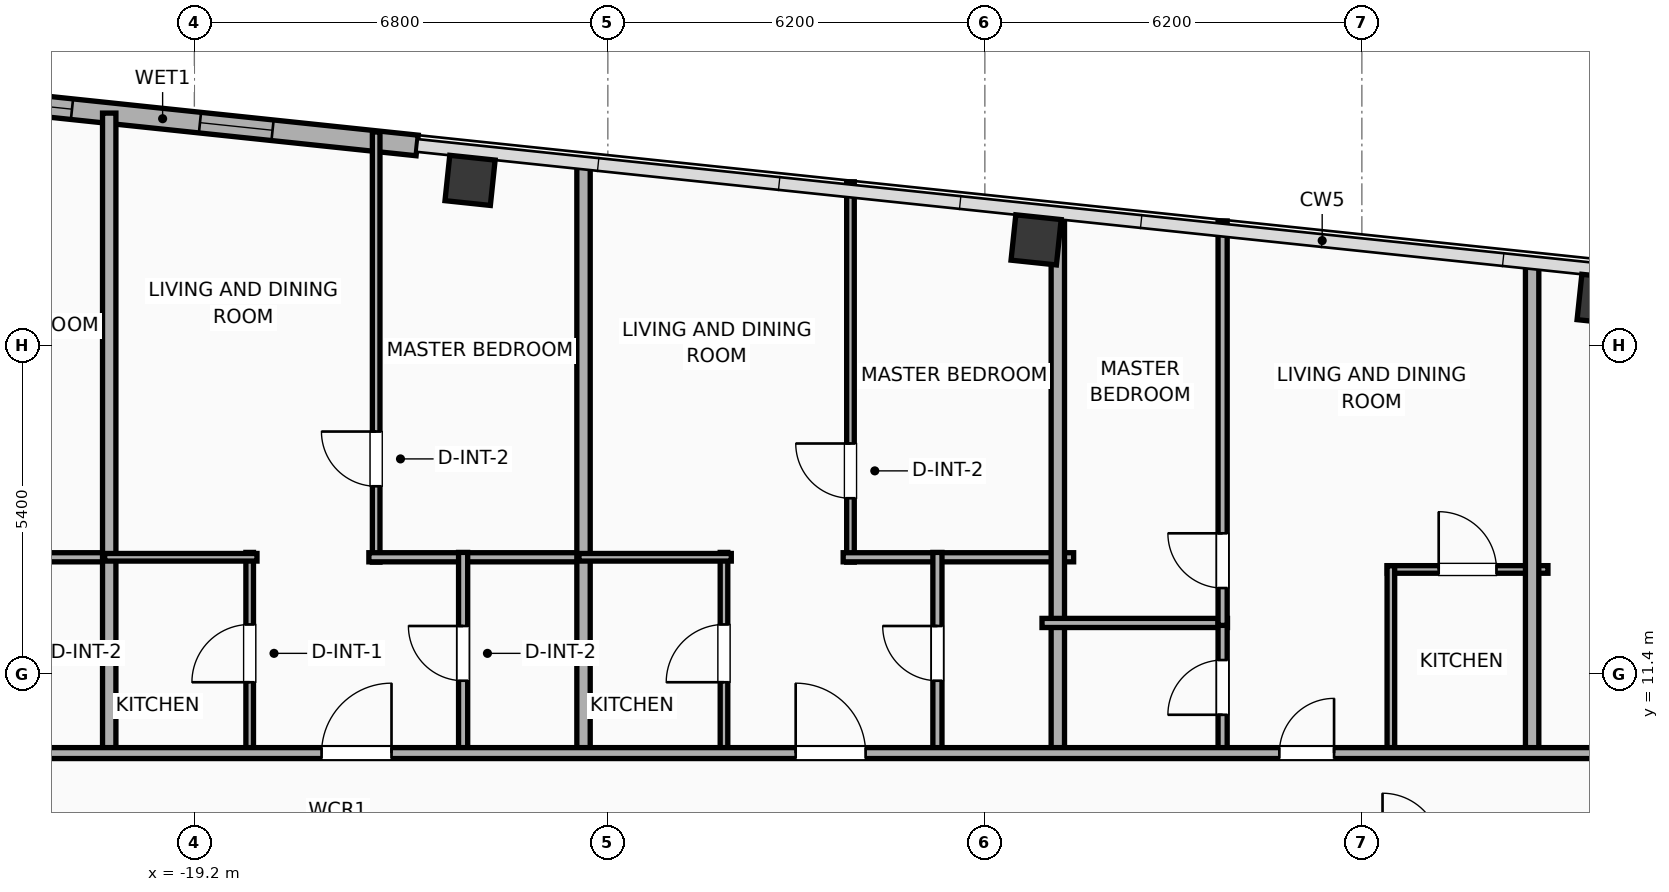
"""IFC4 building model, lengths in metres.
Left out: names, types, materials, properties, quantities, classifications, styles, units other than length and angle.
Written with IfcOpenShell. Run it as: python <this file> out.ifc"""

import sys

from ifc_helpers import new_model, si_unit, direction, frame, frame_2d, origin, origin_2d, place, context, subcontext, project, spatial, rectangle, hollow_rectangle, extrude, element, fill, save


model = new_model("IFC4")
c1 = context("Model", 3, precision=1e-05, world=origin(), true_north=direction((0.0, 1.0)))
c2 = subcontext(c1, "Body", "Model", "MODEL_VIEW")
j1 = project(units=[si_unit("LENGTHUNIT", "METRE"), si_unit("PLANEANGLEUNIT", "RADIAN")], contexts=[c1])
p1 = place(None, origin())
s1 = spatial("IfcSite", under=j1, at=p1, CompositionType="ELEMENT")
p2 = place(p1, origin())
s2 = spatial("IfcBuilding", under=s1, at=p2, CompositionType="ELEMENT")
p3 = place(p2, frame((0.0, 0.0, 260.0)))
s3 = spatial("IfcBuildingStorey", under=s2, at=p3, CompositionType="ELEMENT", Elevation=260.0)
for number, where, z_axis, x_axis in (
    (1, (3.952, 17.561, 0.0), (0.0, 0.0, 1.0), (0.995, -0.105, 0.0)),
    (2, (-5.357, 18.54, 0.0), (0.0, 0.0, 1.0), (0.995, -0.105, 0.0)),
    (3, (-14.666, 19.518, 0.0), (0.0, 0.0, 1.0), (0.995, -0.105, 0.0)),
):
    element("IfcColumn", number, at=place(p3, frame(where, z_axis=z_axis, x_axis=x_axis)), inside=s3, PredefinedType="COLUMN", context=c2, shape_type="SweptSolid", body=[
        extrude(hollow_rectangle(XDim=0.75, YDim=0.75, WallThickness=0.025, at=origin_2d()), origin(), (0.0, 0.0, 1.0), 3.9),
    ])
p4 = place(p3, frame((-23.908, 20.972, 0.0), z_axis=(0.0, 0.0, 1.0), x_axis=(0.994522285292, -0.104524753323, 0.0)))
e4 = element("IfcWall", 4, at=p4, inside=s3, PredefinedType="ELEMENTEDWALL", context=c2, shape_type="SweptSolid", body=[
    extrude(rectangle(XDim=8.418, YDim=0.34, at=frame_2d((4.209, 0.0))), origin(), (0.0, 0.0, 1.0), 2.54),
])
p5 = place(p4, frame((1.51, 0.0, 0.75)))
e5 = element("IfcOpeningElement", 5, at=p5, cuts=e4, PredefinedType="OPENING", context=c2, shape_type="SweptSolid", body=[
    extrude(rectangle(XDim=1.2, YDim=1.63, at=frame_2d((0.6, 0.815))), frame((0.0, 0.18, 0.0), z_axis=(0.0, -1.0, 0.0), x_axis=(1.0, 0.0, 0.0)), (0.0, 0.0, 1.0), 0.36),
])
p6 = place(p4, frame((4.827, 0.0, 0.75)))
e6 = element("IfcOpeningElement", 6, at=p6, cuts=e4, PredefinedType="OPENING", context=c2, shape_type="SweptSolid", body=[
    extrude(rectangle(XDim=1.2, YDim=1.63, at=frame_2d((0.6, 0.815))), frame((0.0, 0.18, 0.0), z_axis=(0.0, -1.0, 0.0), x_axis=(1.0, 0.0, 0.0)), (0.0, 0.0, 1.0), 0.36),
])
p7 = place(p3, frame((-24.13, 13.32, 0.0), z_axis=(0.0, 0.0, 1.0), x_axis=(1.0, 0.0, 0.0)))
e7 = element("IfcWall", 7, at=p7, inside=s3, PredefinedType="PLUMBINGWALL", context=c2, shape_type="SweptSolid", body=[
    extrude(rectangle(XDim=3.605, YDim=0.15, at=frame_2d((1.802, 0.0))), origin(), (0.0, 0.0, 1.0), 3.65),
])
p8 = place(p3, frame((-20.6, 10.02, 0.0), z_axis=(0.0, 0.0, 1.0), x_axis=(0.0, 1.0, 0.0)))
e8 = element("IfcWall", 8, at=p8, inside=s3, PredefinedType="PARTITIONING", context=c2, shape_type="SweptSolid", body=[
    extrude(rectangle(XDim=10.604, YDim=0.22, at=frame_2d((5.302, 0.0))), origin(), (0.0, 0.0, 1.0), 2.54),
])
p9 = place(p3, frame((-16.21, 13.24, 0.0), z_axis=(0.0, 0.0, 1.0), x_axis=(0.0, 1.0, 0.0)))
e9 = element("IfcWall", 9, at=p9, inside=s3, PredefinedType="PARTITIONING", context=c2, shape_type="SweptSolid", body=[
    extrude(rectangle(XDim=7.074, YDim=0.125, at=frame_2d((3.537, 0.0))), origin(), (0.0, 0.0, 1.0), 3.65),
])
p10 = place(p9, frame((1.248, 0.0, 0.0)))
e10 = element("IfcOpeningElement", 10, at=p10, cuts=e9, PredefinedType="OPENING", context=c2, shape_type="SweptSolid", body=[
    extrude(rectangle(XDim=0.9, YDim=2.05, at=frame_2d((0.45, 1.025))), frame((0.0, 0.073, 0.0), z_axis=(0.0, -1.0, 0.0), x_axis=(1.0, 0.0, 0.0)), (0.0, 0.0, 1.0), 0.145),
])
p11 = place(p3, frame((-16.33, 13.32, 0.0), z_axis=(0.0, 0.0, 1.0), x_axis=(1.0, 0.0, 0.0)))
e11 = element("IfcWall", 11, at=p11, inside=s3, PredefinedType="PLUMBINGWALL", context=c2, shape_type="SweptSolid", body=[
    extrude(rectangle(XDim=3.605, YDim=0.15, at=frame_2d((1.802, 0.0))), origin(), (0.0, 0.0, 1.0), 3.65),
])
p12 = place(p3, frame((-18.29, 10.08, 0.0), z_axis=(0.0, 0.0, 1.0), x_axis=(0.0, 1.0, 0.0)))
e12 = element("IfcWall", 12, at=p12, inside=s3, PredefinedType="PARTITIONING", context=c2, shape_type="SweptSolid", body=[
    extrude(rectangle(XDim=3.32, YDim=0.125, at=frame_2d((1.66, 0.0))), origin(), (0.0, 0.0, 1.0), 3.65),
])
p13 = place(p12, frame((1.185, 0.0, 0.0)))
e13 = element("IfcOpeningElement", 13, at=p13, cuts=e12, PredefinedType="OPENING", context=c2, shape_type="SweptSolid", body=[
    extrude(rectangle(XDim=0.95, YDim=2.05, at=frame_2d((0.475, 1.025))), frame((0.0, 0.073, 0.0), z_axis=(0.0, -1.0, 0.0), x_axis=(1.0, 0.0, 0.0)), (0.0, 0.0, 1.0), 0.145),
])
p14 = place(p3, frame((-20.675, 13.32, 0.0), z_axis=(0.0, 0.0, 1.0), x_axis=(1.0, 0.0, 0.0)))
e14 = element("IfcWall", 14, at=p14, inside=s3, PredefinedType="PARTITIONING", context=c2, shape_type="SweptSolid", body=[
    extrude(rectangle(XDim=2.505, YDim=0.125, at=frame_2d((1.252, 0.0))), origin(), (0.0, 0.0, 1.0), 3.65),
])
p15 = place(p3, frame((-14.78, 10.08, 0.0), z_axis=(0.0, 0.0, 1.0), x_axis=(0.0, 1.0, 0.0)))
e15 = element("IfcWall", 15, at=p15, inside=s3, PredefinedType="PLUMBINGWALL", context=c2, shape_type="SweptSolid", body=[
    extrude(rectangle(XDim=3.32, YDim=0.15, at=frame_2d((1.66, 0.0))), origin(), (0.0, 0.0, 1.0), 2.54),
])
p16 = place(p15, frame((1.21, 0.0, 0.0)))
e16 = element("IfcOpeningElement", 16, at=p16, cuts=e15, PredefinedType="OPENING", context=c2, shape_type="SweptSolid", body=[
    extrude(rectangle(XDim=0.9, YDim=2.05, at=frame_2d((0.45, 1.025))), frame((0.0, 0.085, 0.0), z_axis=(0.0, -1.0, 0.0), x_axis=(1.0, 0.0, 0.0)), (0.0, 0.0, 1.0), 0.17),
])
p17 = place(p3, frame((-12.8, 10.02, 0.0), z_axis=(0.0, 0.0, 1.0), x_axis=(0.0, 1.0, 0.0)))
e17 = element("IfcWall", 17, at=p17, inside=s3, PredefinedType="PARTITIONING", context=c2, shape_type="SweptSolid", body=[
    extrude(rectangle(XDim=9.785, YDim=0.22, at=frame_2d((4.892, 0.0))), origin(), (0.0, 0.0, 1.0), 3.65),
])
p18 = place(p3, frame((-8.41, 13.24, 0.0), z_axis=(0.0, 0.0, 1.0), x_axis=(0.0, 1.0, 0.0)))
e18 = element("IfcWall", 18, at=p18, inside=s3, PredefinedType="PARTITIONING", context=c2, shape_type="SweptSolid", body=[
    extrude(rectangle(XDim=6.254, YDim=0.125, at=frame_2d((3.127, 0.0))), origin(), (0.0, 0.0, 1.0), 3.65),
])
p19 = place(p18, frame((1.051, 0.0, 0.0)))
e19 = element("IfcOpeningElement", 19, at=p19, cuts=e18, PredefinedType="OPENING", context=c2, shape_type="SweptSolid", body=[
    extrude(rectangle(XDim=0.9, YDim=2.05, at=frame_2d((0.45, 1.025))), frame((0.0, 0.073, 0.0), z_axis=(0.0, -1.0, 0.0), x_axis=(1.0, 0.0, 0.0)), (0.0, 0.0, 1.0), 0.145),
])
p20 = place(p3, frame((-8.53, 13.32, 0.0), z_axis=(0.0, 0.0, 1.0), x_axis=(1.0, 0.0, 0.0)))
e20 = element("IfcWall", 20, at=p20, inside=s3, PredefinedType="PLUMBINGWALL", context=c2, shape_type="SweptSolid", body=[
    extrude(rectangle(XDim=3.79, YDim=0.15, at=frame_2d((1.895, 0.0))), origin(), (0.0, 0.0, 1.0), 3.65),
])
p21 = place(p3, frame((-10.49, 10.08, 0.0), z_axis=(0.0, 0.0, 1.0), x_axis=(0.0, 1.0, 0.0)))
e21 = element("IfcWall", 21, at=p21, inside=s3, PredefinedType="PARTITIONING", context=c2, shape_type="SweptSolid", body=[
    extrude(rectangle(XDim=3.32, YDim=0.125, at=frame_2d((1.66, 0.0))), origin(), (0.0, 0.0, 1.0), 3.65),
])
p22 = place(p21, frame((1.185, 0.0, 0.0)))
e22 = element("IfcOpeningElement", 22, at=p22, cuts=e21, PredefinedType="OPENING", context=c2, shape_type="SweptSolid", body=[
    extrude(rectangle(XDim=0.95, YDim=2.05, at=frame_2d((0.475, 1.025))), frame((0.0, 0.073, 0.0), z_axis=(0.0, -1.0, 0.0), x_axis=(1.0, 0.0, 0.0)), (0.0, 0.0, 1.0), 0.145),
])
p23 = place(p3, frame((-12.875, 13.32, 0.0), z_axis=(0.0, 0.0, 1.0), x_axis=(1.0, 0.0, 0.0)))
e23 = element("IfcWall", 23, at=p23, inside=s3, PredefinedType="PARTITIONING", context=c2, shape_type="SweptSolid", body=[
    extrude(rectangle(XDim=2.505, YDim=0.125, at=frame_2d((1.252, 0.0))), origin(), (0.0, 0.0, 1.0), 3.65),
])
p24 = place(p3, frame((-6.98, 10.08, 0.0), z_axis=(0.0, 0.0, 1.0), x_axis=(0.0, 1.0, 0.0)))
e24 = element("IfcWall", 24, at=p24, inside=s3, PredefinedType="PLUMBINGWALL", context=c2, shape_type="SweptSolid", body=[
    extrude(rectangle(XDim=3.32, YDim=0.15, at=frame_2d((1.66, 0.0))), origin(), (0.0, 0.0, 1.0), 3.65),
])
p25 = place(p24, frame((1.21, 0.0, 0.0)))
e25 = element("IfcOpeningElement", 25, at=p25, cuts=e24, PredefinedType="OPENING", context=c2, shape_type="SweptSolid", body=[
    extrude(rectangle(XDim=0.9, YDim=2.05, at=frame_2d((0.45, 1.025))), frame((0.0, 0.085, 0.0), z_axis=(0.0, -1.0, 0.0), x_axis=(1.0, 0.0, 0.0)), (0.0, 0.0, 1.0), 0.17),
])
p26 = place(p3, frame((-5.0, 10.02, 0.0), z_axis=(0.0, 0.0, 1.0), x_axis=(0.0, 1.0, 0.0)))
e26 = element("IfcWall", 26, at=p26, inside=s3, PredefinedType="PARTITIONING", context=c2, shape_type="SweptSolid", body=[
    extrude(rectangle(XDim=8.965, YDim=0.22, at=frame_2d((4.482, 0.0))), origin(), (0.0, 0.0, 1.0), 2.54),
])
p27 = place(p3, frame((-5.26, 12.24, 0.0), z_axis=(0.0, 0.0, 1.0), x_axis=(1.0, 0.0, 0.0)))
e27 = element("IfcWall", 27, at=p27, inside=s3, PredefinedType="PLUMBINGWALL", context=c2, shape_type="SweptSolid", body=[
    extrude(rectangle(XDim=3.05, YDim=0.15, at=frame_2d((1.525, 0.0))), origin(), (0.0, 0.0, 1.0), 3.65),
])
p28 = place(p3, frame((-2.29, 10.08, 0.0), z_axis=(0.0, 0.0, 1.0), x_axis=(0.0, 1.0, 0.0)))
e28 = element("IfcWall", 28, at=p28, inside=s3, PredefinedType="PLUMBINGWALL", context=c2, shape_type="SweptSolid", body=[
    extrude(rectangle(XDim=2.2, YDim=0.15, at=frame_2d((1.1, 0.0))), origin(), (0.0, 0.0, 1.0), 3.65),
])
p29 = place(p28, frame((0.65, 0.0, 0.0)))
e29 = element("IfcOpeningElement", 29, at=p29, cuts=e28, PredefinedType="OPENING", context=c2, shape_type="SweptSolid", body=[
    extrude(rectangle(XDim=0.9, YDim=2.05, at=frame_2d((0.45, 1.025))), frame((0.0, 0.085, 0.0), z_axis=(0.0, -1.0, 0.0), x_axis=(1.0, 0.0, 0.0)), (0.0, 0.0, 1.0), 0.17),
])
p30 = place(p3, frame((-2.29, 12.2, 0.0), z_axis=(0.0, 0.0, 1.0), x_axis=(0.0, 1.0, 0.0)))
e30 = element("IfcWall", 30, at=p30, inside=s3, PredefinedType="PLUMBINGWALL", context=c2, shape_type="SweptSolid", body=[
    extrude(rectangle(XDim=6.651, YDim=0.15, at=frame_2d((3.325, 0.0))), origin(), (0.0, 0.0, 1.0), 3.65),
])
p31 = place(p30, frame((0.614, 0.0, 0.0)))
e31 = element("IfcOpeningElement", 31, at=p31, cuts=e30, PredefinedType="OPENING", context=c2, shape_type="SweptSolid", body=[
    extrude(rectangle(XDim=0.9, YDim=2.05, at=frame_2d((0.45, 1.025))), frame((0.0, 0.085, 0.0), z_axis=(0.0, -1.0, 0.0), x_axis=(1.0, 0.0, 0.0)), (0.0, 0.0, 1.0), 0.17),
])
p32 = place(p3, frame((0.417, 13.12, 0.0), z_axis=(0.0, 0.0, 1.0), x_axis=(1.0, 0.0, 0.0)))
e32 = element("IfcWall", 32, at=p32, inside=s3, PredefinedType="PARTITIONING", context=c2, shape_type="SweptSolid", body=[
    extrude(rectangle(XDim=2.643, YDim=0.125, at=frame_2d((1.322, 0.0))), origin(), (0.0, 0.0, 1.0), 3.65),
])
p33 = place(p32, frame((0.846, 0.0, 0.0)))
e33 = element("IfcOpeningElement", 33, at=p33, cuts=e32, PredefinedType="OPENING", context=c2, shape_type="SweptSolid", body=[
    extrude(rectangle(XDim=0.95, YDim=2.05, at=frame_2d((0.475, 1.025))), frame((0.0, 0.073, 0.0), z_axis=(0.0, -1.0, 0.0), x_axis=(1.0, 0.0, 0.0)), (0.0, 0.0, 1.0), 0.145),
])
p34 = place(p3, frame((0.477, 10.08, 0.0), z_axis=(0.0, 0.0, 1.0), x_axis=(0.0, 1.0, 0.0)))
e34 = element("IfcWall", 34, at=p34, inside=s3, PredefinedType="PARTITIONING", context=c2, shape_type="SweptSolid", body=[
    extrude(rectangle(XDim=3.1, YDim=0.125, at=frame_2d((1.55, 0.0))), origin(), (0.0, 0.0, 1.0), 3.65),
])
p35 = place(p3, frame((2.8, 10.02, 0.0), z_axis=(0.0, 0.0, 1.0), x_axis=(0.0, 1.0, 0.0)))
e35 = element("IfcWall", 35, at=p35, inside=s3, PredefinedType="PARTITIONING", context=c2, shape_type="SweptSolid", body=[
    extrude(rectangle(XDim=8.145, YDim=0.22, at=frame_2d((4.073, 0.0))), origin(), (0.0, 0.0, 1.0), 3.65),
])
p36 = place(p3, frame((-28.516, 10.1, 0.0), z_axis=(0.0, 0.0, 1.0), x_axis=(1.0, 0.0, 0.0)))
e36 = element("IfcWall", 36, at=p36, inside=s3, PredefinedType="PARTITIONING", context=c2, shape_type="SweptSolid", body=[
    extrude(rectangle(XDim=53.955, YDim=0.18, at=frame_2d((26.978, 0.0))), origin(), (0.0, 0.0, 1.0), 3.65),
])
p37 = place(p36, frame((3.515, 0.0, 0.0)))
e37 = element("IfcOpeningElement", 37, at=p37, cuts=e36, PredefinedType="OPENING", context=c2, shape_type="SweptSolid", body=[
    extrude(rectangle(XDim=1.15, YDim=2.05, at=frame_2d((0.575, 1.025))), frame((0.0, 0.1, 0.0), z_axis=(0.0, -1.0, 0.0), x_axis=(1.0, 0.0, 0.0)), (0.0, 0.0, 1.0), 0.2),
])
p38 = place(p36, frame((11.408, 0.0, 0.0)))
e38 = element("IfcOpeningElement", 38, at=p38, cuts=e36, PredefinedType="OPENING", context=c2, shape_type="SweptSolid", body=[
    extrude(rectangle(XDim=1.15, YDim=2.05, at=frame_2d((0.575, 1.025))), frame((0.0, 0.1, 0.0), z_axis=(0.0, -1.0, 0.0), x_axis=(1.0, 0.0, 0.0)), (0.0, 0.0, 1.0), 0.2),
])
p39 = place(p36, frame((19.205, 0.0, 0.0)))
e39 = element("IfcOpeningElement", 39, at=p39, cuts=e36, PredefinedType="OPENING", context=c2, shape_type="SweptSolid", body=[
    extrude(rectangle(XDim=1.15, YDim=2.05, at=frame_2d((0.575, 1.025))), frame((0.0, 0.1, 0.0), z_axis=(0.0, -1.0, 0.0), x_axis=(1.0, 0.0, 0.0)), (0.0, 0.0, 1.0), 0.2),
])
p40 = place(p36, frame((27.159, 0.0, 0.0)))
e40 = element("IfcOpeningElement", 40, at=p40, cuts=e36, PredefinedType="OPENING", context=c2, shape_type="SweptSolid", body=[
    extrude(rectangle(XDim=0.9, YDim=2.05, at=frame_2d((0.45, 1.025))), frame((0.0, 0.1, 0.0), z_axis=(0.0, -1.0, 0.0), x_axis=(1.0, 0.0, 0.0)), (0.0, 0.0, 1.0), 0.2),
])
p41 = place(p36, frame((34.642, 0.0, 0.0)))
e41 = element("IfcOpeningElement", 41, at=p41, cuts=e36, PredefinedType="OPENING", context=c2, shape_type="SweptSolid", body=[
    extrude(rectangle(XDim=1.15, YDim=2.05, at=frame_2d((0.575, 1.025))), frame((0.0, 0.1, 0.0), z_axis=(0.0, -1.0, 0.0), x_axis=(1.0, 0.0, 0.0)), (0.0, 0.0, 1.0), 0.2),
])
p42 = place(p36, frame((42.606, 0.0, 0.0)))
e42 = element("IfcOpeningElement", 42, at=p42, cuts=e36, PredefinedType="OPENING", context=c2, shape_type="SweptSolid", body=[
    extrude(rectangle(XDim=1.15, YDim=2.05, at=frame_2d((0.575, 1.025))), frame((0.0, 0.1, 0.0), z_axis=(0.0, -1.0, 0.0), x_axis=(1.0, 0.0, 0.0)), (0.0, 0.0, 1.0), 0.2),
])
p43 = place(p36, frame((50.279, 0.0, 0.0)))
e43 = element("IfcOpeningElement", 43, at=p43, cuts=e36, PredefinedType="OPENING", context=c2, shape_type="SweptSolid", body=[
    extrude(rectangle(XDim=0.9, YDim=2.05, at=frame_2d((0.45, 1.025))), frame((0.0, 0.1, 0.0), z_axis=(0.0, -1.0, 0.0), x_axis=(1.0, 0.0, 0.0)), (0.0, 0.0, 1.0), 0.2),
])
p44 = place(p5, origin())
e44 = element("IfcWindow", 44, at=p44, inside=s3, PartitioningType="SINGLE_PANEL", PredefinedType="WINDOW", context=c2, shape_type="SweptSolid", body=[
    extrude(rectangle(XDim=1.2, YDim=1.63, at=frame_2d((0.6, 0.815))), frame((0.0, 0.03, 0.0), z_axis=(0.0, -1.0, 0.0), x_axis=(1.0, 0.0, 0.0)), (0.0, 0.0, 1.0), 0.06),
])
fill(e5, e44)
p45 = place(p6, origin())
e45 = element("IfcWindow", 45, at=p45, inside=s3, PartitioningType="SINGLE_PANEL", PredefinedType="WINDOW", context=c2, shape_type="SweptSolid", body=[
    extrude(rectangle(XDim=1.2, YDim=1.63, at=frame_2d((0.6, 0.815))), frame((0.0, 0.03, 0.0), z_axis=(0.0, -1.0, 0.0), x_axis=(1.0, 0.0, 0.0)), (0.0, 0.0, 1.0), 0.06),
])
fill(e6, e45)
p46 = place(p10, origin())
e46 = element("IfcDoor", 46, at=p46, inside=s3, OperationType="SINGLE_SWING_RIGHT", PredefinedType="DOOR", context=c2, shape_type="SweptSolid", body=[
    extrude(rectangle(XDim=0.9, YDim=2.05, at=frame_2d((0.45, 1.025))), frame((0.0, 0.025, 0.0), z_axis=(0.0, -1.0, 0.0), x_axis=(1.0, 0.0, 0.0)), (0.0, 0.0, 1.0), 0.05),
])
fill(e10, e46)
p47 = place(p13, origin())
e47 = element("IfcDoor", 47, at=p47, inside=s3, OperationType="SINGLE_SWING_LEFT", PredefinedType="DOOR", context=c2, shape_type="SweptSolid", body=[
    extrude(rectangle(XDim=0.95, YDim=2.05, at=frame_2d((0.475, 1.025))), frame((0.0, 0.025, 0.0), z_axis=(0.0, -1.0, 0.0), x_axis=(1.0, 0.0, 0.0)), (0.0, 0.0, 1.0), 0.05),
])
fill(e13, e47)
p48 = place(p16, origin())
e48 = element("IfcDoor", 48, at=p48, inside=s3, OperationType="SINGLE_SWING_RIGHT", PredefinedType="DOOR", context=c2, shape_type="SweptSolid", body=[
    extrude(rectangle(XDim=0.9, YDim=2.05, at=frame_2d((0.45, 1.025))), frame((0.0, 0.025, 0.0), z_axis=(0.0, -1.0, 0.0), x_axis=(1.0, 0.0, 0.0)), (0.0, 0.0, 1.0), 0.05),
])
fill(e16, e48)
p49 = place(p19, origin())
e49 = element("IfcDoor", 49, at=p49, inside=s3, OperationType="SINGLE_SWING_RIGHT", PredefinedType="DOOR", context=c2, shape_type="SweptSolid", body=[
    extrude(rectangle(XDim=0.9, YDim=2.05, at=frame_2d((0.45, 1.025))), frame((0.0, 0.025, 0.0), z_axis=(0.0, -1.0, 0.0), x_axis=(1.0, 0.0, 0.0)), (0.0, 0.0, 1.0), 0.05),
])
fill(e19, e49)
p50 = place(p22, origin())
e50 = element("IfcDoor", 50, at=p50, inside=s3, OperationType="SINGLE_SWING_LEFT", PredefinedType="DOOR", context=c2, shape_type="SweptSolid", body=[
    extrude(rectangle(XDim=0.95, YDim=2.05, at=frame_2d((0.475, 1.025))), frame((0.0, 0.025, 0.0), z_axis=(0.0, -1.0, 0.0), x_axis=(1.0, 0.0, 0.0)), (0.0, 0.0, 1.0), 0.05),
])
fill(e22, e50)
p51 = place(p25, origin())
e51 = element("IfcDoor", 51, at=p51, inside=s3, OperationType="SINGLE_SWING_RIGHT", PredefinedType="DOOR", context=c2, shape_type="SweptSolid", body=[
    extrude(rectangle(XDim=0.9, YDim=2.05, at=frame_2d((0.45, 1.025))), frame((0.0, 0.025, 0.0), z_axis=(0.0, -1.0, 0.0), x_axis=(1.0, 0.0, 0.0)), (0.0, 0.0, 1.0), 0.05),
])
fill(e25, e51)
p52 = place(p29, origin())
e52 = element("IfcDoor", 52, at=p52, inside=s3, OperationType="SINGLE_SWING_LEFT", PredefinedType="DOOR", context=c2, shape_type="SweptSolid", body=[
    extrude(rectangle(XDim=0.9, YDim=2.05, at=frame_2d((0.45, 1.025))), frame((0.0, 0.025, 0.0), z_axis=(0.0, -1.0, 0.0), x_axis=(1.0, 0.0, 0.0)), (0.0, 0.0, 1.0), 0.05),
])
fill(e29, e52)
p53 = place(p31, origin())
e53 = element("IfcDoor", 53, at=p53, inside=s3, OperationType="SINGLE_SWING_RIGHT", PredefinedType="DOOR", context=c2, shape_type="SweptSolid", body=[
    extrude(rectangle(XDim=0.9, YDim=2.05, at=frame_2d((0.45, 1.025))), frame((0.0, 0.025, 0.0), z_axis=(0.0, -1.0, 0.0), x_axis=(1.0, 0.0, 0.0)), (0.0, 0.0, 1.0), 0.05),
])
fill(e31, e53)
p54 = place(p33, origin())
e54 = element("IfcDoor", 54, at=p54, inside=s3, OperationType="SINGLE_SWING_LEFT", PredefinedType="DOOR", context=c2, shape_type="SweptSolid", body=[
    extrude(rectangle(XDim=0.95, YDim=2.05, at=frame_2d((0.475, 1.025))), frame((0.0, 0.025, 0.0), z_axis=(0.0, -1.0, 0.0), x_axis=(1.0, 0.0, 0.0)), (0.0, 0.0, 1.0), 0.05),
])
fill(e33, e54)
p55 = place(p38, origin())
e55 = element("IfcDoor", 55, at=p55, inside=s3, OperationType="SINGLE_SWING_RIGHT", PredefinedType="DOOR", context=c2, shape_type="SweptSolid", body=[
    extrude(rectangle(XDim=1.15, YDim=2.05, at=frame_2d((0.575, 1.025))), frame((0.0, 0.025, 0.0), z_axis=(0.0, -1.0, 0.0), x_axis=(1.0, 0.0, 0.0)), (0.0, 0.0, 1.0), 0.05),
])
fill(e38, e55)
p56 = place(p39, origin())
e56 = element("IfcDoor", 56, at=p56, inside=s3, OperationType="SINGLE_SWING_LEFT", PredefinedType="DOOR", context=c2, shape_type="SweptSolid", body=[
    extrude(rectangle(XDim=1.15, YDim=2.05, at=frame_2d((0.575, 1.025))), frame((0.0, 0.025, 0.0), z_axis=(0.0, -1.0, 0.0), x_axis=(1.0, 0.0, 0.0)), (0.0, 0.0, 1.0), 0.05),
])
fill(e39, e56)
p57 = place(p40, origin())
e57 = element("IfcDoor", 57, at=p57, inside=s3, OperationType="SINGLE_SWING_RIGHT", PredefinedType="DOOR", context=c2, shape_type="SweptSolid", body=[
    extrude(rectangle(XDim=0.9, YDim=2.05, at=frame_2d((0.45, 1.025))), frame((0.0, 0.025, 0.0), z_axis=(0.0, -1.0, 0.0), x_axis=(1.0, 0.0, 0.0)), (0.0, 0.0, 1.0), 0.05),
])
fill(e40, e57)
save(model, sys.argv[1])
